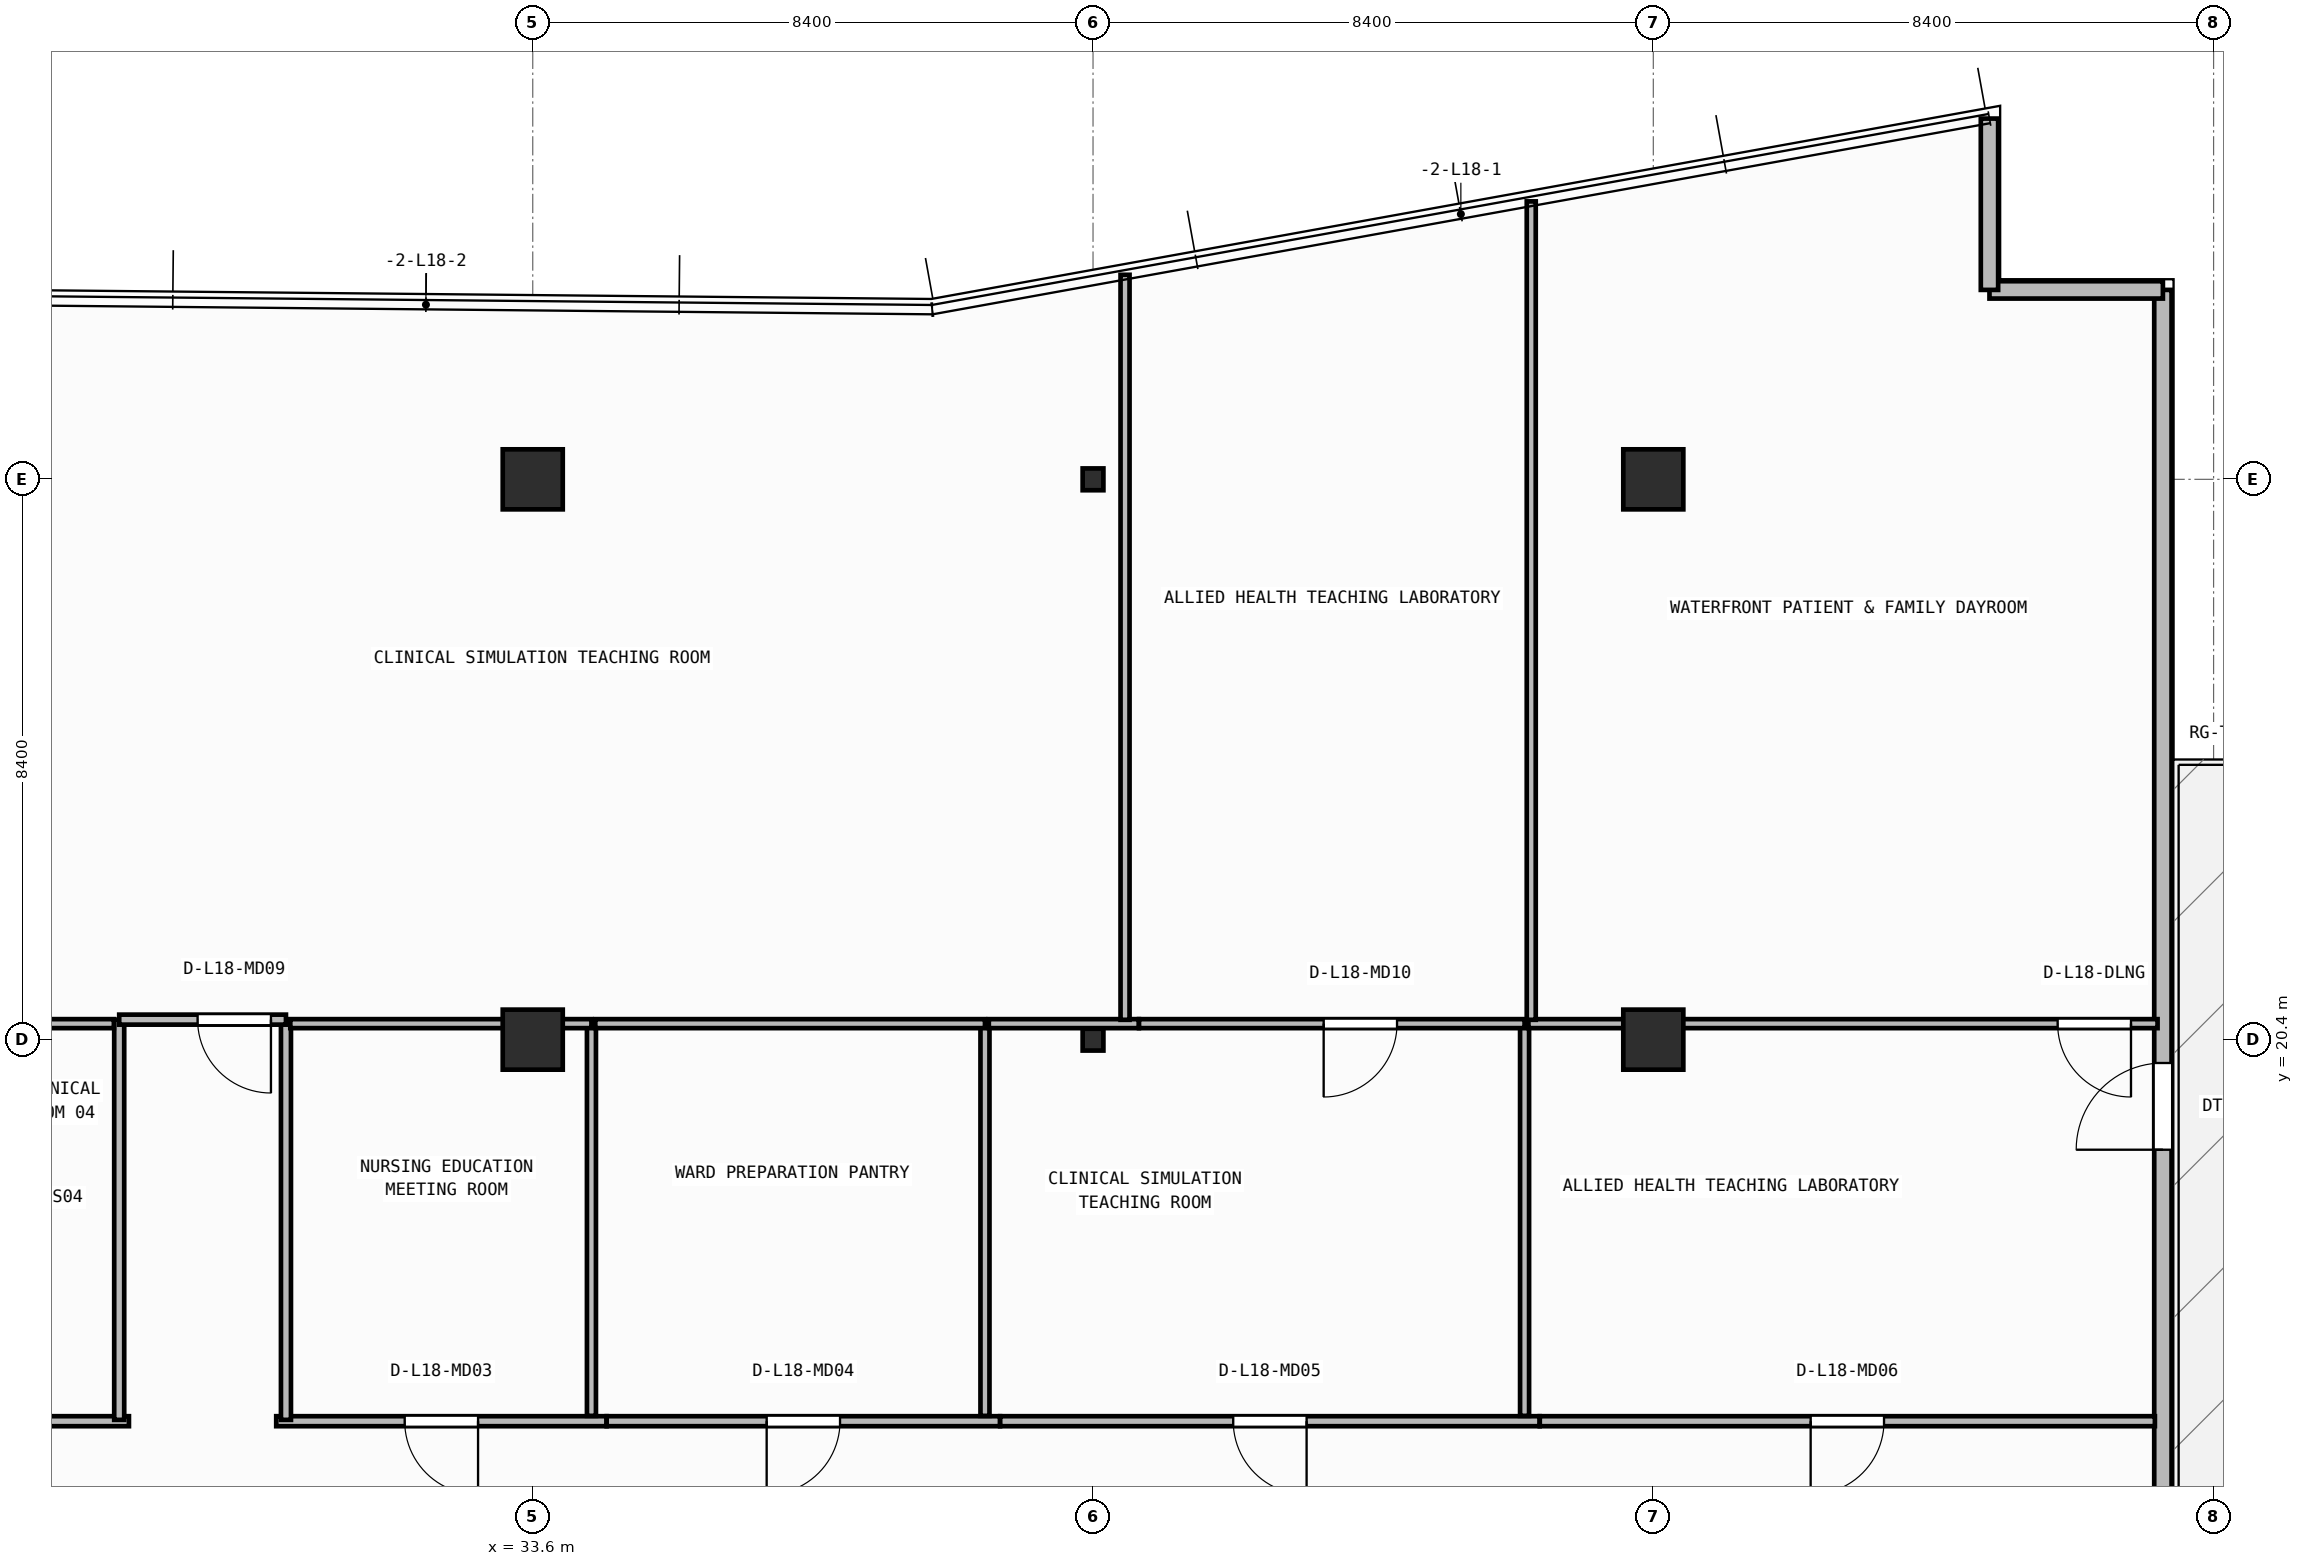
"""IFC4 building model, lengths in metres.
Left out: names, types, materials, properties, quantities, classifications, styles, units other than length and angle.
Written with IfcOpenShell. Run it as: python <this file> out.ifc"""

import sys

from ifc_helpers import new_model, si_unit, direction, frame, frame_2d, origin, origin_2d, place, context, subcontext, project, spatial, rectangle, i_section, extrude, element, fill, save


model = new_model("IFC4")
c1 = context("Model", 3, precision=1e-05, world=origin(), true_north=direction((0.0, 1.0)))
c2 = subcontext(c1, "Body", "Model", "MODEL_VIEW")
j1 = project(units=[si_unit("LENGTHUNIT", "METRE"), si_unit("PLANEANGLEUNIT", "RADIAN")], contexts=[c1])
p1 = place(None, origin())
s1 = spatial("IfcSite", under=j1, at=p1, CompositionType="ELEMENT")
p2 = place(p1, origin())
s2 = spatial("IfcBuilding", under=s1, at=p2, CompositionType="ELEMENT")
p3 = place(p2, frame((0.0, 0.0, 73.85)))
s3 = spatial("IfcBuildingStorey", under=s2, at=p3, CompositionType="ELEMENT", Elevation=73.85)
p4 = place(p3, frame((33.6, 20.4, 0.0), z_axis=(0.0, 0.0, 1.0), x_axis=(1.0, 0.0, 0.0)))
e1 = element("IfcColumn", 1, at=p4, inside=s3, PredefinedType="COLUMN", context=c2, shape_type="SweptSolid", body=[
    extrude(rectangle(XDim=0.9, YDim=0.9, at=origin_2d()), origin(), (0.0, 0.0, 1.0), 3.95),
])
p5 = place(p3, frame((42.0, 20.4, 0.0), z_axis=(0.0, 0.0, 1.0), x_axis=(1.0, 0.0, 0.0)))
e2 = element("IfcColumn", 2, at=p5, inside=s3, PredefinedType="COLUMN", context=c2, shape_type="SweptSolid", body=[
    extrude(i_section(OverallWidth=0.311, OverallDepth=0.327, WebThickness=0.016, FlangeThickness=0.025, FilletRadius=0.017, at=origin_2d()), origin(), (0.0, 0.0, 1.0), 3.95),
])
for number, where, z_axis, x_axis in (
    (3, (50.4, 20.4, 0.0), (0.0, 0.0, 1.0), (1.0, 0.0, 0.0)),
    (4, (33.6, 28.8, 0.0), (0.0, 0.0, 1.0), (1.0, 0.0, 0.0)),
):
    element("IfcColumn", number, at=place(p3, frame(where, z_axis=z_axis, x_axis=x_axis)), inside=s3, PredefinedType="COLUMN", context=c2, shape_type="SweptSolid", body=[
        extrude(rectangle(XDim=0.9, YDim=0.9, at=origin_2d()), origin(), (0.0, 0.0, 1.0), 3.95),
    ])
p6 = place(p3, frame((42.0, 28.8, 0.0), z_axis=(0.0, 0.0, 1.0), x_axis=(1.0, 0.0, 0.0)))
e5 = element("IfcColumn", 5, at=p6, inside=s3, PredefinedType="COLUMN", context=c2, shape_type="SweptSolid", body=[
    extrude(i_section(OverallWidth=0.311, OverallDepth=0.327, WebThickness=0.016, FlangeThickness=0.025, FilletRadius=0.017, at=origin_2d()), origin(), (0.0, 0.0, 1.0), 3.95),
])
p7 = place(p3, frame((50.4, 28.8, 0.0), z_axis=(0.0, 0.0, 1.0), x_axis=(1.0, 0.0, 0.0)))
e6 = element("IfcColumn", 6, at=p7, inside=s3, PredefinedType="COLUMN", context=c2, shape_type="SweptSolid", body=[
    extrude(rectangle(XDim=0.9, YDim=0.9, at=origin_2d()), origin(), (0.0, 0.0, 1.0), 3.95),
])
p8 = place(p3, frame((58.04, 7.16, 0.0), z_axis=(0.0, 0.0, 1.0), x_axis=(0.0, 1.0, 0.0)))
e7 = element("IfcWall", 7, at=p8, inside=s3, PredefinedType="STANDARD", context=c2, shape_type="SweptSolid", body=[
    extrude(rectangle(XDim=24.48, YDim=0.26, at=frame_2d((12.24, 0.0))), origin(), (0.0, 0.0, 1.0), 3.71),
])
p9 = place(p8, frame((11.59, 0.0, 0.0)))
e8 = element("IfcOpeningElement", 8, at=p9, cuts=e7, PredefinedType="OPENING", context=c2, shape_type="SweptSolid", body=[
    extrude(rectangle(XDim=1.3, YDim=2.15, at=frame_2d((0.65, 1.075))), frame((0.0, 0.14, 0.0), z_axis=(0.0, -1.0, 0.0), x_axis=(1.0, 0.0, 0.0)), (0.0, 0.0, 1.0), 0.28),
])
p10 = place(p3, frame((58.04, 31.64, 0.0), z_axis=(0.0, 0.0, 1.0), x_axis=(-1.0, 0.0, 0.0)))
e9 = element("IfcWall", 9, at=p10, inside=s3, PredefinedType="STANDARD", context=c2, shape_type="SweptSolid", body=[
    extrude(rectangle(XDim=2.6, YDim=0.26, at=frame_2d((1.3, 0.0))), origin(), (0.0, 0.0, 1.0), 3.71),
])
p11 = place(p3, frame((55.44, 31.64, 0.0), z_axis=(0.0, 0.0, 1.0), x_axis=(0.0, 1.0, 0.0)))
e10 = element("IfcWall", 10, at=p11, inside=s3, PredefinedType="STANDARD", context=c2, shape_type="SweptSolid", body=[
    extrude(rectangle(XDim=2.569, YDim=0.26, at=frame_2d((1.284, 0.0))), origin(), (0.0, 0.0, 1.0), 3.71),
])
p12 = place(p3, frame((27.546, 14.68, 0.0), z_axis=(0.0, 0.0, 1.0), x_axis=(-1.0, 0.0, 0.0)))
e11 = element("IfcWall", 11, at=p12, inside=s3, PredefinedType="PARTITIONING", context=c2, shape_type="SweptSolid", body=[
    extrude(rectangle(XDim=4.588, YDim=0.15, at=frame_2d((2.294, 0.0))), origin(), (0.0, 0.0, 1.0), 3.71),
])
p13 = place(p12, frame((1.744, 0.0, 0.0)))
e12 = element("IfcOpeningElement", 12, at=p13, cuts=e11, PredefinedType="OPENING", context=c2, shape_type="SweptSolid", body=[
    extrude(rectangle(XDim=1.1, YDim=2.1, at=frame_2d((0.55, 1.05))), frame((0.0, 0.085, 0.0), z_axis=(0.0, -1.0, 0.0), x_axis=(1.0, 0.0, 0.0)), (0.0, 0.0, 1.0), 0.17),
])
p14 = place(p3, frame((34.706, 14.68, 0.0), z_axis=(0.0, 0.0, 1.0), x_axis=(-1.0, 0.0, 0.0)))
e13 = element("IfcWall", 13, at=p14, inside=s3, PredefinedType="PARTITIONING", context=c2, shape_type="SweptSolid", body=[
    extrude(rectangle(XDim=4.952, YDim=0.15, at=frame_2d((2.476, 0.0))), origin(), (0.0, 0.0, 1.0), 3.71),
])
p15 = place(p14, frame((1.926, 0.0, 0.0)))
e14 = element("IfcOpeningElement", 14, at=p15, cuts=e13, PredefinedType="OPENING", context=c2, shape_type="SweptSolid", body=[
    extrude(rectangle(XDim=1.1, YDim=2.1, at=frame_2d((0.55, 1.05))), frame((0.0, 0.085, 0.0), z_axis=(0.0, -1.0, 0.0), x_axis=(1.0, 0.0, 0.0)), (0.0, 0.0, 1.0), 0.17),
])
p16 = place(p3, frame((40.606, 14.68, 0.0), z_axis=(0.0, 0.0, 1.0), x_axis=(-1.0, 0.0, 0.0)))
e15 = element("IfcWall", 15, at=p16, inside=s3, PredefinedType="PARTITIONING", context=c2, shape_type="SweptSolid", body=[
    extrude(rectangle(XDim=5.898, YDim=0.15, at=frame_2d((2.949, 0.0))), origin(), (0.0, 0.0, 1.0), 3.71),
])
p17 = place(p16, frame((2.399, 0.0, 0.0)))
e16 = element("IfcOpeningElement", 16, at=p17, cuts=e15, PredefinedType="OPENING", context=c2, shape_type="SweptSolid", body=[
    extrude(rectangle(XDim=1.1, YDim=2.1, at=frame_2d((0.55, 1.05))), frame((0.0, 0.085, 0.0), z_axis=(0.0, -1.0, 0.0), x_axis=(1.0, 0.0, 0.0)), (0.0, 0.0, 1.0), 0.17),
])
p18 = place(p3, frame((48.696, 14.68, 0.0), z_axis=(0.0, 0.0, 1.0), x_axis=(-1.0, 0.0, 0.0)))
e17 = element("IfcWall", 17, at=p18, inside=s3, PredefinedType="PARTITIONING", context=c2, shape_type="SweptSolid", body=[
    extrude(rectangle(XDim=8.088, YDim=0.15, at=frame_2d((4.044, 0.0))), origin(), (0.0, 0.0, 1.0), 3.71),
])
p19 = place(p18, frame((3.494, 0.0, 0.0)))
e18 = element("IfcOpeningElement", 18, at=p19, cuts=e17, PredefinedType="OPENING", context=c2, shape_type="SweptSolid", body=[
    extrude(rectangle(XDim=1.1, YDim=2.1, at=frame_2d((0.55, 1.05))), frame((0.0, 0.085, 0.0), z_axis=(0.0, -1.0, 0.0), x_axis=(1.0, 0.0, 0.0)), (0.0, 0.0, 1.0), 0.17),
])
p20 = place(p3, frame((57.92, 14.68, 0.0), z_axis=(0.0, 0.0, 1.0), x_axis=(-1.0, 0.0, 0.0)))
e19 = element("IfcWall", 19, at=p20, inside=s3, PredefinedType="PARTITIONING", context=c2, shape_type="SweptSolid", body=[
    extrude(rectangle(XDim=9.222, YDim=0.15, at=frame_2d((4.611, 0.0))), origin(), (0.0, 0.0, 1.0), 3.71),
])
p21 = place(p20, frame((4.061, 0.0, 0.0)))
e20 = element("IfcOpeningElement", 20, at=p21, cuts=e19, PredefinedType="OPENING", context=c2, shape_type="SweptSolid", body=[
    extrude(rectangle(XDim=1.1, YDim=2.1, at=frame_2d((0.55, 1.05))), frame((0.0, 0.085, 0.0), z_axis=(0.0, -1.0, 0.0), x_axis=(1.0, 0.0, 0.0)), (0.0, 0.0, 1.0), 0.17),
])
for number, where, z_axis, x_axis in (
    (21, (27.4, 20.7, 0.0), (0.0, 0.0, 1.0), (0.0, -1.0, 0.0)),
    (22, (29.9, 14.7, 0.0), (0.0, 0.0, 1.0), (0.0, 1.0, 0.0)),
):
    element("IfcWall", number, at=place(p3, frame(where, z_axis=z_axis, x_axis=x_axis)), inside=s3, PredefinedType="PARTITIONING", context=c2, shape_type="SweptSolid", body=[
        extrude(rectangle(XDim=6.0, YDim=0.15, at=frame_2d((3.0, 0.0))), origin(), (0.0, 0.0, 1.0), 3.71),
    ])
p22 = place(p3, frame((29.9, 20.7, 0.0), z_axis=(0.0, 0.0, 1.0), x_axis=(-1.0, 0.0, 0.0)))
e23 = element("IfcWall", 23, at=p22, inside=s3, PredefinedType="PARTITIONING", context=c2, shape_type="SweptSolid", body=[
    extrude(rectangle(XDim=2.5, YDim=0.15, at=frame_2d((1.25, 0.0))), origin(), (0.0, 0.0, 1.0), 3.073),
])
p23 = place(p22, frame((0.225, 0.0, 0.0)))
e24 = element("IfcOpeningElement", 24, at=p23, cuts=e23, PredefinedType="OPENING", context=c2, shape_type="SweptSolid", body=[
    extrude(rectangle(XDim=1.1, YDim=2.1, at=frame_2d((0.55, 1.05))), frame((0.0, 0.085, 0.0), z_axis=(0.0, -1.0, 0.0), x_axis=(1.0, 0.0, 0.0)), (0.0, 0.0, 1.0), 0.17),
])
p24 = place(p3, frame((27.32, 20.64, 0.0), z_axis=(0.0, 0.0, 1.0), x_axis=(-1.0, 0.0, 0.0)))
e25 = element("IfcWall", 25, at=p24, inside=s3, PredefinedType="PARTITIONING", context=c2, shape_type="SweptSolid", body=[
    extrude(rectangle(XDim=1.121, YDim=0.135, at=frame_2d((0.56, 0.0))), origin(), (0.0, 0.0, 1.0), 3.073),
])
p25 = place(p3, frame((34.48, 14.76, 0.0), z_axis=(0.0, 0.0, 1.0), x_axis=(0.0, 1.0, 0.0)))
e26 = element("IfcWall", 26, at=p25, inside=s3, PredefinedType="PARTITIONING", context=c2, shape_type="SweptSolid", body=[
    extrude(rectangle(XDim=5.88, YDim=0.135, at=frame_2d((2.94, 0.0))), origin(), (0.0, 0.0, 1.0), 3.71),
])
p26 = place(p3, frame((34.48, 20.64, 0.0), z_axis=(0.0, 0.0, 1.0), x_axis=(-1.0, 0.0, 0.0)))
e27 = element("IfcWall", 27, at=p26, inside=s3, PredefinedType="PARTITIONING", context=c2, shape_type="SweptSolid", body=[
    extrude(rectangle(XDim=4.515, YDim=0.135, at=frame_2d((2.257, 0.0))), origin(), (0.0, 0.0, 1.0), 3.073),
])
p27 = place(p3, frame((40.38, 14.76, 0.0), z_axis=(0.0, 0.0, 1.0), x_axis=(0.0, 1.0, 0.0)))
e28 = element("IfcWall", 28, at=p27, inside=s3, PredefinedType="PARTITIONING", context=c2, shape_type="SweptSolid", body=[
    extrude(rectangle(XDim=5.88, YDim=0.135, at=frame_2d((2.94, 0.0))), origin(), (0.0, 0.0, 1.0), 3.71),
])
p28 = place(p3, frame((40.38, 20.64, 0.0), z_axis=(0.0, 0.0, 1.0), x_axis=(-1.0, 0.0, 0.0)))
e29 = element("IfcWall", 29, at=p28, inside=s3, PredefinedType="PARTITIONING", context=c2, shape_type="SweptSolid", body=[
    extrude(rectangle(XDim=5.842, YDim=0.135, at=frame_2d((2.921, 0.0))), origin(), (0.0, 0.0, 1.0), 3.073),
])
p29 = place(p3, frame((48.47, 14.76, 0.0), z_axis=(0.0, 0.0, 1.0), x_axis=(0.0, 1.0, 0.0)))
e30 = element("IfcWall", 30, at=p29, inside=s3, PredefinedType="PARTITIONING", context=c2, shape_type="SweptSolid", body=[
    extrude(rectangle(XDim=5.88, YDim=0.135, at=frame_2d((2.94, 0.0))), origin(), (0.0, 0.0, 1.0), 3.71),
])
p30 = place(p3, frame((42.688, 20.64, 0.0), z_axis=(0.0, 0.0, 1.0), x_axis=(-1.0, 0.0, 0.0)))
e31 = element("IfcWall", 31, at=p30, inside=s3, PredefinedType="PARTITIONING", context=c2, shape_type="SweptSolid", body=[
    extrude(rectangle(XDim=2.25, YDim=0.135, at=frame_2d((1.125, 0.0))), origin(), (0.0, 0.0, 1.0), 3.073),
])
p31 = place(p3, frame((48.47, 20.64, 0.0), z_axis=(0.0, 0.0, 1.0), x_axis=(-1.0, 0.0, 0.0)))
e32 = element("IfcWall", 32, at=p31, inside=s3, PredefinedType="PARTITIONING", context=c2, shape_type="SweptSolid", body=[
    extrude(rectangle(XDim=5.781, YDim=0.135, at=frame_2d((2.89, 0.0))), origin(), (0.0, 0.0, 1.0), 3.073),
])
p32 = place(p31, frame((1.912, 0.0, 0.0)))
e33 = element("IfcOpeningElement", 33, at=p32, cuts=e32, PredefinedType="OPENING", context=c2, shape_type="SweptSolid", body=[
    extrude(rectangle(XDim=1.1, YDim=2.1, at=frame_2d((0.55, 1.05))), frame((0.0, 0.077, 0.0), z_axis=(0.0, -1.0, 0.0), x_axis=(1.0, 0.0, 0.0)), (0.0, 0.0, 1.0), 0.155),
])
p33 = place(p3, frame((57.96, 20.64, 0.0), z_axis=(0.0, 0.0, 1.0), x_axis=(-1.0, 0.0, 0.0)))
e34 = element("IfcWall", 34, at=p33, inside=s3, PredefinedType="PARTITIONING", context=c2, shape_type="SweptSolid", body=[
    extrude(rectangle(XDim=9.432, YDim=0.135, at=frame_2d((4.716, 0.0))), origin(), (0.0, 0.0, 1.0), 3.073),
])
p34 = place(p33, frame((0.398, 0.0, 0.0)))
e35 = element("IfcOpeningElement", 35, at=p34, cuts=e34, PredefinedType="OPENING", context=c2, shape_type="SweptSolid", body=[
    extrude(rectangle(XDim=1.1, YDim=2.1, at=frame_2d((0.55, 1.05))), frame((0.0, 0.077, 0.0), z_axis=(0.0, -1.0, 0.0), x_axis=(1.0, 0.0, 0.0)), (0.0, 0.0, 1.0), 0.155),
])
p35 = place(p3, frame((42.48, 20.698, 0.0), z_axis=(0.0, 0.0, 1.0), x_axis=(0.0, 1.0, 0.0)))
e36 = element("IfcWall", 36, at=p35, inside=s3, PredefinedType="PARTITIONING", context=c2, shape_type="SweptSolid", body=[
    extrude(rectangle(XDim=11.169, YDim=0.135, at=frame_2d((5.584, 0.0))), origin(), (0.0, 0.0, 1.0), 3.073),
])
p36 = place(p3, frame((48.57, 20.698, 0.0), z_axis=(0.0, 0.0, 1.0), x_axis=(0.0, 1.0, 0.0)))
e37 = element("IfcWall", 37, at=p36, inside=s3, PredefinedType="PARTITIONING", context=c2, shape_type="SweptSolid", body=[
    extrude(rectangle(XDim=12.269, YDim=0.135, at=frame_2d((6.135, 0.0))), origin(), (0.0, 0.0, 1.0), 3.71),
])
p37 = place(p9, origin())
e38 = element("IfcDoor", 38, at=p37, inside=s3, OperationType="SINGLE_SWING_LEFT", PredefinedType="DOOR", context=c2, shape_type="SweptSolid", body=[
    extrude(rectangle(XDim=1.3, YDim=2.15, at=frame_2d((0.65, 1.075))), frame((0.0, 0.025, 0.0), z_axis=(0.0, -1.0, 0.0), x_axis=(1.0, 0.0, 0.0)), (0.0, 0.0, 1.0), 0.05),
])
fill(e8, e38)
p38 = place(p15, origin())
e39 = element("IfcDoor", 39, at=p38, inside=s3, OperationType="SINGLE_SWING_LEFT", PredefinedType="DOOR", context=c2, shape_type="SweptSolid", body=[
    extrude(rectangle(XDim=1.1, YDim=2.1, at=frame_2d((0.55, 1.05))), frame((0.0, 0.025, 0.0), z_axis=(0.0, -1.0, 0.0), x_axis=(1.0, 0.0, 0.0)), (0.0, 0.0, 1.0), 0.05),
])
fill(e14, e39)
p39 = place(p17, origin())
e40 = element("IfcDoor", 40, at=p39, inside=s3, OperationType="SINGLE_SWING_RIGHT", PredefinedType="DOOR", context=c2, shape_type="SweptSolid", body=[
    extrude(rectangle(XDim=1.1, YDim=2.1, at=frame_2d((0.55, 1.05))), frame((0.0, 0.025, 0.0), z_axis=(0.0, -1.0, 0.0), x_axis=(1.0, 0.0, 0.0)), (0.0, 0.0, 1.0), 0.05),
])
fill(e16, e40)
p40 = place(p19, origin())
e41 = element("IfcDoor", 41, at=p40, inside=s3, OperationType="SINGLE_SWING_LEFT", PredefinedType="DOOR", context=c2, shape_type="SweptSolid", body=[
    extrude(rectangle(XDim=1.1, YDim=2.1, at=frame_2d((0.55, 1.05))), frame((0.0, 0.025, 0.0), z_axis=(0.0, -1.0, 0.0), x_axis=(1.0, 0.0, 0.0)), (0.0, 0.0, 1.0), 0.05),
])
fill(e18, e41)
p41 = place(p21, origin())
e42 = element("IfcDoor", 42, at=p41, inside=s3, OperationType="SINGLE_SWING_RIGHT", PredefinedType="DOOR", context=c2, shape_type="SweptSolid", body=[
    extrude(rectangle(XDim=1.1, YDim=2.1, at=frame_2d((0.55, 1.05))), frame((0.0, 0.025, 0.0), z_axis=(0.0, -1.0, 0.0), x_axis=(1.0, 0.0, 0.0)), (0.0, 0.0, 1.0), 0.05),
])
fill(e20, e42)
p42 = place(p23, origin())
e43 = element("IfcDoor", 43, at=p42, inside=s3, OperationType="SINGLE_SWING_LEFT", PredefinedType="DOOR", context=c2, shape_type="SweptSolid", body=[
    extrude(rectangle(XDim=1.1, YDim=2.1, at=frame_2d((0.55, 1.05))), frame((0.0, 0.025, 0.0), z_axis=(0.0, -1.0, 0.0), x_axis=(1.0, 0.0, 0.0)), (0.0, 0.0, 1.0), 0.05),
])
fill(e24, e43)
p43 = place(p32, origin())
e44 = element("IfcDoor", 44, at=p43, inside=s3, OperationType="SINGLE_SWING_RIGHT", PredefinedType="DOOR", context=c2, shape_type="SweptSolid", body=[
    extrude(rectangle(XDim=1.1, YDim=2.1, at=frame_2d((0.55, 1.05))), frame((0.0, 0.025, 0.0), z_axis=(0.0, -1.0, 0.0), x_axis=(1.0, 0.0, 0.0)), (0.0, 0.0, 1.0), 0.05),
])
fill(e33, e44)
p44 = place(p34, origin())
e45 = element("IfcDoor", 45, at=p44, inside=s3, OperationType="SINGLE_SWING_LEFT", PredefinedType="DOOR", context=c2, shape_type="SweptSolid", body=[
    extrude(rectangle(XDim=1.1, YDim=2.1, at=frame_2d((0.55, 1.05))), frame((0.0, 0.025, 0.0), z_axis=(0.0, -1.0, 0.0), x_axis=(1.0, 0.0, 0.0)), (0.0, 0.0, 1.0), 0.05),
])
fill(e35, e45)
save(model, sys.argv[1])
